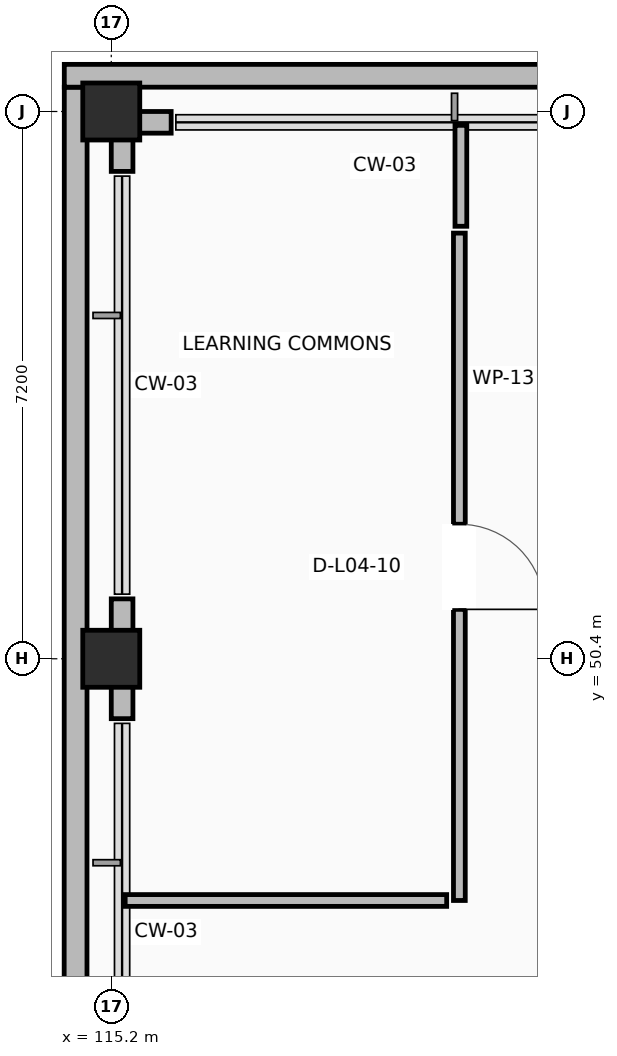
"""IFC4 building model, lengths in metres.
Left out: names, types, materials, properties, quantities, classifications, styles, units other than length and angle.
Written with IfcOpenShell. Run it as: python <this file> out.ifc"""

import sys

from ifc_helpers import new_model, si_unit, direction, frame, frame_2d, origin, origin_2d, place, context, subcontext, project, spatial, rectangle, extrude, element, fill, save


model = new_model("IFC4")
c1 = context("Model", 3, precision=1e-05, world=origin(), true_north=direction((0.0, 1.0)))
c2 = subcontext(c1, "Body", "Model", "MODEL_VIEW")
j1 = project(units=[si_unit("LENGTHUNIT", "METRE"), si_unit("PLANEANGLEUNIT", "RADIAN")], contexts=[c1])
p1 = place(None, origin())
s1 = spatial("IfcSite", under=j1, at=p1, CompositionType="ELEMENT")
p2 = place(p1, origin())
s2 = spatial("IfcBuilding", under=s1, at=p2, CompositionType="ELEMENT")
p3 = place(p2, frame((0.0, 0.0, 18.0)))
s3 = spatial("IfcBuildingStorey", under=s2, at=p3, CompositionType="ELEMENT", Elevation=18.0)
for number, where, z_axis, x_axis in (
    (1, (115.2, 50.4, 0.0), (0.0, 0.0, 1.0), (1.0, 0.0, 0.0)),
    (2, (115.2, 57.6, 0.0), (0.0, 0.0, 1.0), (1.0, 0.0, 0.0)),
):
    element("IfcColumn", number, at=place(p3, frame(where, z_axis=z_axis, x_axis=x_axis)), inside=s3, PredefinedType="COLUMN", context=c2, shape_type="SweptSolid", body=[
        extrude(rectangle(XDim=0.75, YDim=0.75, at=origin_2d()), origin(), (0.0, 0.0, 1.0), 4.5),
    ])
p4 = place(p3, frame((115.988, 57.458, 0.0), z_axis=(0.0, 0.0, 1.0), x_axis=(-1.0, 0.0, 0.0)))
e3 = element("IfcWall", 3, at=p4, inside=s3, PredefinedType="STANDARD", context=c2, shape_type="SweptSolid", body=[
    extrude(rectangle(XDim=0.788, YDim=0.285, at=frame_2d((0.394, 0.0))), origin(), (0.0, 0.0, 1.0), 3.26),
])
p5 = place(p3, frame((115.343, 57.315, 0.0), z_axis=(0.0, 0.0, 1.0), x_axis=(0.0, -1.0, 0.0)))
e4 = element("IfcWall", 4, at=p5, inside=s3, PredefinedType="STANDARD", context=c2, shape_type="SweptSolid", body=[
    extrude(rectangle(XDim=0.503, YDim=0.285, at=frame_2d((0.251, 0.0))), origin(), (0.0, 0.0, 1.0), 3.26),
])
p6 = place(p3, frame((115.343, 51.188, 0.0), z_axis=(0.0, 0.0, 1.0), x_axis=(0.0, -1.0, 0.0)))
e5 = element("IfcWall", 5, at=p6, inside=s3, PredefinedType="STANDARD", context=c2, shape_type="SweptSolid", body=[
    extrude(rectangle(XDim=1.576, YDim=0.285, at=frame_2d((0.788, 0.0))), origin(), (0.0, 0.0, 1.0), 3.26),
])
p7 = place(p3, frame((114.73, 42.882, 0.0), z_axis=(0.0, 0.0, 1.0), x_axis=(0.000129880671, 0.999999991566, 0.0)))
e6 = element("IfcWall", 6, at=p7, inside=s3, PredefinedType="PARAPET", context=c2, shape_type="SweptSolid", body=[
    extrude(rectangle(XDim=15.038, YDim=0.3, at=frame_2d((7.519, 0.0))), origin(), (0.0, 0.0, 1.0), 1.18),
])
p8 = place(p3, frame((114.582, 58.07, 0.0), z_axis=(0.0, 0.0, 1.0), x_axis=(0.99999999887, -4.7535295e-05, 0.0)))
e7 = element("IfcWall", 7, at=p8, inside=s3, PredefinedType="PARAPET", context=c2, shape_type="SweptSolid", body=[
    extrude(rectangle(XDim=41.088, YDim=0.3, at=frame_2d((20.544, 0.0))), origin(), (0.0, 0.0, 1.0), 1.18),
])
p9 = place(p3, frame((119.78, 56.0, 0.0), z_axis=(0.0, 0.0, 1.0), x_axis=(0.0, -1.0, 0.0)))
e8 = element("IfcWall", 8, at=p9, inside=s3, PredefinedType="PARTITIONING", context=c2, shape_type="SweptSolid", body=[
    extrude(rectangle(XDim=8.78, YDim=0.155, at=frame_2d((4.39, 0.0))), origin(), (0.0, 0.0, 1.0), 3.26),
])
p10 = place(p9, frame((3.83, 0.0, 0.0)))
e9 = element("IfcOpeningElement", 9, at=p10, cuts=e8, PredefinedType="OPENING", context=c2, shape_type="SweptSolid", body=[
    extrude(rectangle(XDim=1.12, YDim=2.15, at=frame_2d((0.56, 1.075))), frame((0.0, 0.087, 0.0), z_axis=(0.0, -1.0, 0.0), x_axis=(1.0, 0.0, 0.0)), (0.0, 0.0, 1.0), 0.175),
])
p11 = place(p3, frame((119.613, 47.22, 0.0), z_axis=(0.0, 0.0, 1.0), x_axis=(-1.0, 0.0, 0.0)))
e10 = element("IfcWall", 10, at=p11, inside=s3, PredefinedType="PARTITIONING", context=c2, shape_type="SweptSolid", body=[
    extrude(rectangle(XDim=4.23, YDim=0.155, at=frame_2d((2.115, 0.0))), origin(), (0.0, 0.0, 1.0), 3.26),
])
p12 = place(p3, frame((119.8, 57.418, 0.0), z_axis=(0.0, 0.0, 1.0), x_axis=(0.0, -1.0, 0.0)))
e11 = element("IfcWall", 11, at=p12, inside=s3, PredefinedType="PARTITIONING", context=c2, shape_type="SweptSolid", body=[
    extrude(rectangle(XDim=1.328, YDim=0.155, at=frame_2d((0.664, 0.0))), origin(), (0.0, 0.0, 1.0), 3.26),
])
p13 = place(p10, origin())
e12 = element("IfcDoor", 12, at=p13, inside=s3, OperationType="SINGLE_SWING_RIGHT", PredefinedType="DOOR", context=c2, shape_type="SweptSolid", body=[
    extrude(rectangle(XDim=1.12, YDim=2.15, at=frame_2d((0.56, 1.075))), frame((0.0, 0.025, 0.0), z_axis=(0.0, -1.0, 0.0), x_axis=(1.0, 0.0, 0.0)), (0.0, 0.0, 1.0), 0.05),
])
fill(e9, e12)
save(model, sys.argv[1])
